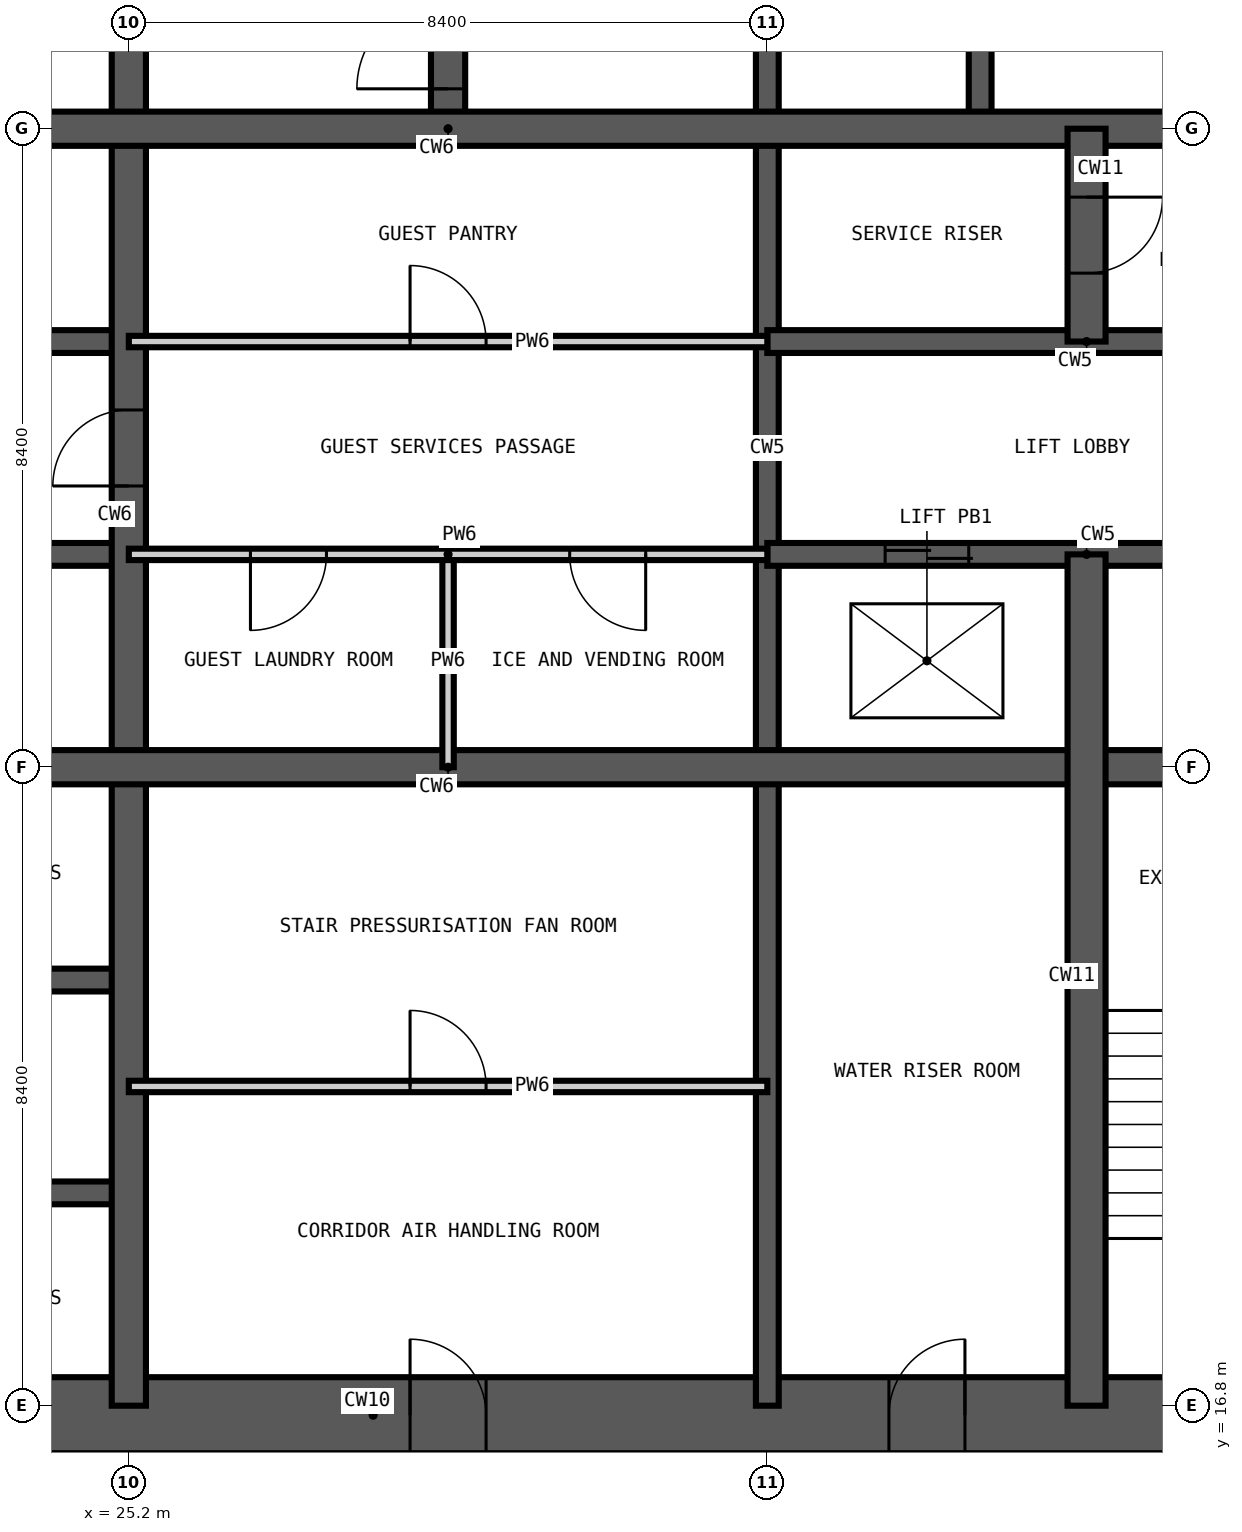
"""IFC4 building model, lengths in metres.
Left out: names, types, materials, properties, quantities, classifications, styles, units other than length and angle.
Written with IfcOpenShell. Run it as: python <this file> out.ifc"""

import sys

from ifc_helpers import new_model, si_unit, direction, frame, frame_2d, origin, place, context, subcontext, project, spatial, rectangle, extrude, element, fill, save


model = new_model("IFC4")
c1 = context("Model", 3, precision=1e-05, world=origin(), true_north=direction((0.0, 1.0)))
c2 = subcontext(c1, "Body", "Model", "MODEL_VIEW")
j1 = project(units=[si_unit("LENGTHUNIT", "METRE"), si_unit("PLANEANGLEUNIT", "RADIAN")], contexts=[c1])
p1 = place(None, origin())
s1 = spatial("IfcSite", under=j1, at=p1, CompositionType="ELEMENT")
p2 = place(p1, origin())
s2 = spatial("IfcBuilding", under=s1, at=p2, CompositionType="ELEMENT")
p3 = place(p2, frame((0.0, 0.0, 118.8)))
s3 = spatial("IfcBuildingStorey", under=s2, at=p3, CompositionType="ELEMENT", Elevation=118.8)
p4 = place(p3, frame((16.175, 16.675, -0.35), z_axis=(0.0, 0.0, 1.0), x_axis=(1.0, 0.0, 0.0)))
e1 = element("IfcWall", 1, at=p4, inside=s3, PredefinedType="SHEAR", context=c2, shape_type="SweptSolid", body=[
    extrude(rectangle(XDim=26.45, YDim=1.0, at=frame_2d((13.225, 0.0))), origin(), (0.0, 0.0, 1.0), 3.6),
])
p5 = place(p4, frame((12.725, 0.0, 0.35)))
e2 = element("IfcOpeningElement", 2, at=p5, cuts=e1, PredefinedType="OPENING", context=c2, shape_type="SweptSolid", body=[
    extrude(rectangle(XDim=1.0, YDim=2.1, at=frame_2d((0.5, 1.05))), frame((0.0, 0.51, 0.0), z_axis=(0.0, -1.0, 0.0), x_axis=(1.0, 0.0, 0.0)), (0.0, 0.0, 1.0), 1.02),
])
p6 = place(p4, frame((19.025, 0.0, 0.35)))
e3 = element("IfcOpeningElement", 3, at=p6, cuts=e1, PredefinedType="OPENING", context=c2, shape_type="SweptSolid", body=[
    extrude(rectangle(XDim=1.0, YDim=2.1, at=frame_2d((0.5, 1.05))), frame((0.0, 0.51, 0.0), z_axis=(0.0, -1.0, 0.0), x_axis=(1.0, 0.0, 0.0)), (0.0, 0.0, 1.0), 1.02),
])
p7 = place(p3, frame((33.6, 16.8, -0.35), z_axis=(0.0, 0.0, 1.0), x_axis=(0.0, 1.0, 0.0)))
e4 = element("IfcWall", 4, at=p7, inside=s3, PredefinedType="SHEAR", context=c2, shape_type="SweptSolid", body=[
    extrude(rectangle(XDim=25.2, YDim=0.3, at=frame_2d((12.6, 0.0))), origin(), (0.0, 0.0, 1.0), 3.6),
])
p8 = place(p7, frame((22.5, 0.0, 0.35)))
e5 = element("IfcOpeningElement", 5, at=p8, cuts=e4, PredefinedType="OPENING", context=c2, shape_type="SweptSolid", body=[
    extrude(rectangle(XDim=1.2, YDim=2.2, at=frame_2d((0.6, 1.1))), frame((0.0, 0.16, 0.0), z_axis=(0.0, -1.0, 0.0), x_axis=(1.0, 0.0, 0.0)), (0.0, 0.0, 1.0), 0.32),
])
p9 = place(p7, frame((18.3, 0.0, 0.35)))
e6 = element("IfcOpeningElement", 6, at=p9, cuts=e4, PredefinedType="OPENING", context=c2, shape_type="SweptSolid", body=[
    extrude(rectangle(XDim=1.2, YDim=2.2, at=frame_2d((0.6, 1.1))), frame((0.0, 0.16, 0.0), z_axis=(0.0, -1.0, 0.0), x_axis=(1.0, 0.0, 0.0)), (0.0, 0.0, 1.0), 0.32),
])
for number, where, z_axis, x_axis in (
    (7, (36.4, 33.6, -0.35), (0.0, 0.0, 1.0), (0.0, 1.0, 0.0)),
    (8, (16.8, 19.6, -0.35), (0.0, 0.0, 1.0), (1.0, 0.0, 0.0)),
    (9, (16.8, 22.4, -0.35), (0.0, 0.0, 1.0), (1.0, 0.0, 0.0)),
):
    element("IfcWall", number, at=place(p3, frame(where, z_axis=z_axis, x_axis=x_axis)), inside=s3, PredefinedType="SHEAR", context=c2, shape_type="SweptSolid", body=[
        extrude(rectangle(XDim=8.4, YDim=0.3, at=frame_2d((4.2, 0.0))), origin(), (0.0, 0.0, 1.0), 3.6),
    ])
p10 = place(p3, frame((16.8, 28.0, -0.35), z_axis=(0.0, 0.0, 1.0), x_axis=(1.0, 0.0, 0.0)))
e10 = element("IfcWall", 10, at=p10, inside=s3, PredefinedType="SHEAR", context=c2, shape_type="SweptSolid", body=[
    extrude(rectangle(XDim=8.4, YDim=0.3, at=frame_2d((4.2, 0.0))), origin(), (0.0, 0.0, 1.0), 3.6),
])
p11 = place(p10, frame((1.55, 0.0, 0.35)))
e11 = element("IfcOpeningElement", 11, at=p11, cuts=e10, PredefinedType="OPENING", context=c2, shape_type="SweptSolid", body=[
    extrude(rectangle(XDim=1.1, YDim=2.2, at=frame_2d((0.55, 1.1))), frame((0.0, 0.16, 0.0), z_axis=(0.0, -1.0, 0.0), x_axis=(1.0, 0.0, 0.0)), (0.0, 0.0, 1.0), 0.32),
])
p12 = place(p10, frame((5.75, 0.0, 0.35)))
e12 = element("IfcOpeningElement", 12, at=p12, cuts=e10, PredefinedType="OPENING", context=c2, shape_type="SweptSolid", body=[
    extrude(rectangle(XDim=1.1, YDim=2.2, at=frame_2d((0.55, 1.1))), frame((0.0, 0.16, 0.0), z_axis=(0.0, -1.0, 0.0), x_axis=(1.0, 0.0, 0.0)), (0.0, 0.0, 1.0), 0.32),
])
p13 = place(p3, frame((33.6, 28.0, -0.35), z_axis=(0.0, 0.0, 1.0), x_axis=(1.0, 0.0, 0.0)))
e13 = element("IfcWall", 13, at=p13, inside=s3, PredefinedType="SHEAR", context=c2, shape_type="SweptSolid", body=[
    extrude(rectangle(XDim=8.4, YDim=0.3, at=frame_2d((4.2, 0.0))), origin(), (0.0, 0.0, 1.0), 3.6),
])
p14 = place(p13, frame((1.55, 0.0, 0.35)))
e14 = element("IfcOpeningElement", 14, at=p14, cuts=e13, PredefinedType="OPENING", context=c2, shape_type="SweptSolid", body=[
    extrude(rectangle(XDim=1.1, YDim=2.2, at=frame_2d((0.55, 1.1))), frame((0.0, 0.16, 0.0), z_axis=(0.0, -1.0, 0.0), x_axis=(1.0, 0.0, 0.0)), (0.0, 0.0, 1.0), 0.32),
])
p15 = place(p13, frame((5.75, 0.0, 0.35)))
e15 = element("IfcOpeningElement", 15, at=p15, cuts=e13, PredefinedType="OPENING", context=c2, shape_type="SweptSolid", body=[
    extrude(rectangle(XDim=1.1, YDim=2.2, at=frame_2d((0.55, 1.1))), frame((0.0, 0.16, 0.0), z_axis=(0.0, -1.0, 0.0), x_axis=(1.0, 0.0, 0.0)), (0.0, 0.0, 1.0), 0.32),
])
p16 = place(p3, frame((16.8, 30.8, -0.35), z_axis=(0.0, 0.0, 1.0), x_axis=(1.0, 0.0, 0.0)))
e16 = element("IfcWall", 16, at=p16, inside=s3, PredefinedType="SHEAR", context=c2, shape_type="SweptSolid", body=[
    extrude(rectangle(XDim=8.4, YDim=0.3, at=frame_2d((4.2, 0.0))), origin(), (0.0, 0.0, 1.0), 3.6),
])
p17 = place(p16, frame((1.55, 0.0, 0.35)))
e17 = element("IfcOpeningElement", 17, at=p17, cuts=e16, PredefinedType="OPENING", context=c2, shape_type="SweptSolid", body=[
    extrude(rectangle(XDim=1.1, YDim=2.2, at=frame_2d((0.55, 1.1))), frame((0.0, 0.16, 0.0), z_axis=(0.0, -1.0, 0.0), x_axis=(1.0, 0.0, 0.0)), (0.0, 0.0, 1.0), 0.32),
])
p18 = place(p16, frame((5.75, 0.0, 0.35)))
e18 = element("IfcOpeningElement", 18, at=p18, cuts=e16, PredefinedType="OPENING", context=c2, shape_type="SweptSolid", body=[
    extrude(rectangle(XDim=1.1, YDim=2.2, at=frame_2d((0.55, 1.1))), frame((0.0, 0.16, 0.0), z_axis=(0.0, -1.0, 0.0), x_axis=(1.0, 0.0, 0.0)), (0.0, 0.0, 1.0), 0.32),
])
p19 = place(p3, frame((33.6, 30.8, -0.35), z_axis=(0.0, 0.0, 1.0), x_axis=(1.0, 0.0, 0.0)))
e19 = element("IfcWall", 19, at=p19, inside=s3, PredefinedType="SHEAR", context=c2, shape_type="SweptSolid", body=[
    extrude(rectangle(XDim=8.4, YDim=0.3, at=frame_2d((4.2, 0.0))), origin(), (0.0, 0.0, 1.0), 3.6),
])
p20 = place(p3, frame((25.2, 16.8, -0.35), z_axis=(0.0, 0.0, 1.0), x_axis=(0.0, 1.0, 0.0)))
e20 = element("IfcWall", 20, at=p20, inside=s3, PredefinedType="SHEAR", context=c2, shape_type="SweptSolid", body=[
    extrude(rectangle(XDim=25.2, YDim=0.45, at=frame_2d((12.6, 0.0))), origin(), (0.0, 0.0, 1.0), 3.6),
])
p21 = place(p20, frame((12.1, 0.0, 0.35)))
e21 = element("IfcOpeningElement", 21, at=p21, cuts=e20, PredefinedType="OPENING", context=c2, shape_type="SweptSolid", body=[
    extrude(rectangle(XDim=1.0, YDim=2.1, at=frame_2d((0.5, 1.05))), frame((0.0, 0.235, 0.0), z_axis=(0.0, -1.0, 0.0), x_axis=(1.0, 0.0, 0.0)), (0.0, 0.0, 1.0), 0.47),
])
p22 = place(p3, frame((29.4, 33.6, -0.35), z_axis=(0.0, 0.0, 1.0), x_axis=(0.0, 1.0, 0.0)))
e22 = element("IfcWall", 22, at=p22, inside=s3, PredefinedType="SHEAR", context=c2, shape_type="SweptSolid", body=[
    extrude(rectangle(XDim=8.4, YDim=0.45, at=frame_2d((4.2, 0.0))), origin(), (0.0, 0.0, 1.0), 3.6),
])
p23 = place(p22, frame((0.525, 0.0, 0.35)))
e23 = element("IfcOpeningElement", 23, at=p23, cuts=e22, PredefinedType="OPENING", context=c2, shape_type="SweptSolid", body=[
    extrude(rectangle(XDim=1.2, YDim=2.2, at=frame_2d((0.6, 1.1))), frame((0.0, 0.235, 0.0), z_axis=(0.0, -1.0, 0.0), x_axis=(1.0, 0.0, 0.0)), (0.0, 0.0, 1.0), 0.47),
])
p24 = place(p3, frame((16.8, 25.2, -0.35), z_axis=(0.0, 0.0, 1.0), x_axis=(1.0, 0.0, 0.0)))
e24 = element("IfcWall", 24, at=p24, inside=s3, PredefinedType="SHEAR", context=c2, shape_type="SweptSolid", body=[
    extrude(rectangle(XDim=25.2, YDim=0.45, at=frame_2d((12.6, 0.0))), origin(), (0.0, 0.0, 1.0), 3.6),
])
p25 = place(p3, frame((16.8, 33.6, -0.35), z_axis=(0.0, 0.0, 1.0), x_axis=(1.0, 0.0, 0.0)))
e25 = element("IfcWall", 25, at=p25, inside=s3, PredefinedType="SHEAR", context=c2, shape_type="SweptSolid", body=[
    extrude(rectangle(XDim=25.2, YDim=0.45, at=frame_2d((12.6, 0.0))), origin(), (0.0, 0.0, 1.0), 3.6),
])
p26 = place(p25, frame((22.6, 0.0, 0.35)))
e26 = element("IfcOpeningElement", 26, at=p26, cuts=e25, PredefinedType="OPENING", context=c2, shape_type="SweptSolid", body=[
    extrude(rectangle(XDim=1.0, YDim=2.1, at=frame_2d((0.5, 1.05))), frame((0.0, 0.235, 0.0), z_axis=(0.0, -1.0, 0.0), x_axis=(1.0, 0.0, 0.0)), (0.0, 0.0, 1.0), 0.47),
])
p27 = place(p3, frame((37.8, 16.8, -0.35), z_axis=(0.0, 0.0, 1.0), x_axis=(0.0, 1.0, 0.0)))
e27 = element("IfcWall", 27, at=p27, inside=s3, PredefinedType="SHEAR", context=c2, shape_type="SweptSolid", body=[
    extrude(rectangle(XDim=11.2, YDim=0.5, at=frame_2d((5.6, 0.0))), origin(), (0.0, 0.0, 1.0), 3.6),
])
p28 = place(p3, frame((37.8, 30.8, -0.35), z_axis=(0.0, 0.0, 1.0), x_axis=(0.0, 1.0, 0.0)))
e28 = element("IfcWall", 28, at=p28, inside=s3, PredefinedType="SHEAR", context=c2, shape_type="SweptSolid", body=[
    extrude(rectangle(XDim=2.8, YDim=0.5, at=frame_2d((1.4, 0.0))), origin(), (0.0, 0.0, 1.0), 3.6),
])
p29 = place(p28, frame((0.9, 0.0, 0.35)))
e29 = element("IfcOpeningElement", 29, at=p29, cuts=e28, PredefinedType="OPENING", context=c2, shape_type="SweptSolid", body=[
    extrude(rectangle(XDim=1.0, YDim=2.1, at=frame_2d((0.5, 1.05))), frame((0.0, 0.26, 0.0), z_axis=(0.0, -1.0, 0.0), x_axis=(1.0, 0.0, 0.0)), (0.0, 0.0, 1.0), 0.52),
])
p30 = place(p3, frame((29.4, 25.2, 0.0), z_axis=(0.0, 0.0, 1.0), x_axis=(0.0, 1.0, 0.0)))
e30 = element("IfcWall", 30, at=p30, inside=s3, PredefinedType="PARTITIONING", context=c2, shape_type="SweptSolid", body=[
    extrude(rectangle(XDim=2.8, YDim=0.15, at=frame_2d((1.4, 0.0))), origin(), (0.0, 0.0, 1.0), 3.25),
])
p31 = place(p3, frame((25.2, 21.0, 0.0), z_axis=(0.0, 0.0, 1.0), x_axis=(1.0, 0.0, 0.0)))
e31 = element("IfcWall", 31, at=p31, inside=s3, PredefinedType="PARTITIONING", context=c2, shape_type="SweptSolid", body=[
    extrude(rectangle(XDim=8.4, YDim=0.15, at=frame_2d((4.2, 0.0))), origin(), (0.0, 0.0, 1.0), 3.25),
])
p32 = place(p31, frame((3.7, 0.0, 0.0)))
e32 = element("IfcOpeningElement", 32, at=p32, cuts=e31, PredefinedType="OPENING", context=c2, shape_type="SweptSolid", body=[
    extrude(rectangle(XDim=1.0, YDim=2.1, at=frame_2d((0.5, 1.05))), frame((0.0, 0.085, 0.0), z_axis=(0.0, -1.0, 0.0), x_axis=(1.0, 0.0, 0.0)), (0.0, 0.0, 1.0), 0.17),
])
p33 = place(p3, frame((25.2, 28.0, 0.0), z_axis=(0.0, 0.0, 1.0), x_axis=(1.0, 0.0, 0.0)))
e33 = element("IfcWall", 33, at=p33, inside=s3, PredefinedType="PARTITIONING", context=c2, shape_type="SweptSolid", body=[
    extrude(rectangle(XDim=8.4, YDim=0.15, at=frame_2d((4.2, 0.0))), origin(), (0.0, 0.0, 1.0), 3.25),
])
p34 = place(p33, frame((1.6, 0.0, 0.0)))
e34 = element("IfcOpeningElement", 34, at=p34, cuts=e33, PredefinedType="OPENING", context=c2, shape_type="SweptSolid", body=[
    extrude(rectangle(XDim=1.0, YDim=2.1, at=frame_2d((0.5, 1.05))), frame((0.0, 0.085, 0.0), z_axis=(0.0, -1.0, 0.0), x_axis=(1.0, 0.0, 0.0)), (0.0, 0.0, 1.0), 0.17),
])
p35 = place(p33, frame((5.8, 0.0, 0.0)))
e35 = element("IfcOpeningElement", 35, at=p35, cuts=e33, PredefinedType="OPENING", context=c2, shape_type="SweptSolid", body=[
    extrude(rectangle(XDim=1.0, YDim=2.1, at=frame_2d((0.5, 1.05))), frame((0.0, 0.085, 0.0), z_axis=(0.0, -1.0, 0.0), x_axis=(1.0, 0.0, 0.0)), (0.0, 0.0, 1.0), 0.17),
])
p36 = place(p3, frame((25.2, 30.8, 0.0), z_axis=(0.0, 0.0, 1.0), x_axis=(1.0, 0.0, 0.0)))
e36 = element("IfcWall", 36, at=p36, inside=s3, PredefinedType="PARTITIONING", context=c2, shape_type="SweptSolid", body=[
    extrude(rectangle(XDim=8.4, YDim=0.15, at=frame_2d((4.2, 0.0))), origin(), (0.0, 0.0, 1.0), 3.25),
])
p37 = place(p36, frame((3.7, 0.0, 0.0)))
e37 = element("IfcOpeningElement", 37, at=p37, cuts=e36, PredefinedType="OPENING", context=c2, shape_type="SweptSolid", body=[
    extrude(rectangle(XDim=1.0, YDim=2.1, at=frame_2d((0.5, 1.05))), frame((0.0, 0.085, 0.0), z_axis=(0.0, -1.0, 0.0), x_axis=(1.0, 0.0, 0.0)), (0.0, 0.0, 1.0), 0.17),
])
p38 = place(p23, origin())
e38 = element("IfcDoor", 38, at=p38, inside=s3, OperationType="SINGLE_SWING_LEFT", PredefinedType="DOOR", context=c2, shape_type="SweptSolid", body=[
    extrude(rectangle(XDim=1.2, YDim=2.2, at=frame_2d((0.6, 1.1))), frame((0.0, 0.025, 0.0), z_axis=(0.0, -1.0, 0.0), x_axis=(1.0, 0.0, 0.0)), (0.0, 0.0, 1.0), 0.05),
])
fill(e23, e38)
p39 = place(p14, origin())
e39 = element("IfcDoor", 39, at=p39, inside=s3, OperationType="DOUBLE_DOOR_SLIDING", PredefinedType="DOOR", context=c2, shape_type="SweptSolid", body=[
    extrude(rectangle(XDim=1.1, YDim=2.2, at=frame_2d((0.55, 1.1))), frame((0.0, 0.025, 0.0), z_axis=(0.0, -1.0, 0.0), x_axis=(1.0, 0.0, 0.0)), (0.0, 0.0, 1.0), 0.05),
])
fill(e14, e39)
p40 = place(p21, origin())
e40 = element("IfcDoor", 40, at=p40, inside=s3, OperationType="SINGLE_SWING_LEFT", PredefinedType="DOOR", context=c2, shape_type="SweptSolid", body=[
    extrude(rectangle(XDim=1.0, YDim=2.1, at=frame_2d((0.5, 1.05))), frame((0.0, 0.025, 0.0), z_axis=(0.0, -1.0, 0.0), x_axis=(1.0, 0.0, 0.0)), (0.0, 0.0, 1.0), 0.05),
])
fill(e21, e40)
p41 = place(p34, frame((1.0, 0.0, 0.0), z_axis=(0.0, 0.0, 1.0), x_axis=(-1.0, 0.0, 0.0)))
e41 = element("IfcDoor", 41, at=p41, inside=s3, OperationType="SINGLE_SWING_RIGHT", PredefinedType="DOOR", context=c2, shape_type="SweptSolid", body=[
    extrude(rectangle(XDim=1.0, YDim=2.1, at=frame_2d((0.5, 1.05))), frame((0.0, 0.025, 0.0), z_axis=(0.0, -1.0, 0.0), x_axis=(1.0, 0.0, 0.0)), (0.0, 0.0, 1.0), 0.05),
])
fill(e34, e41)
p42 = place(p35, frame((1.0, 0.0, 0.0), z_axis=(0.0, 0.0, 1.0), x_axis=(-1.0, 0.0, 0.0)))
e42 = element("IfcDoor", 42, at=p42, inside=s3, OperationType="SINGLE_SWING_LEFT", PredefinedType="DOOR", context=c2, shape_type="SweptSolid", body=[
    extrude(rectangle(XDim=1.0, YDim=2.1, at=frame_2d((0.5, 1.05))), frame((0.0, 0.025, 0.0), z_axis=(0.0, -1.0, 0.0), x_axis=(1.0, 0.0, 0.0)), (0.0, 0.0, 1.0), 0.05),
])
fill(e35, e42)
p43 = place(p37, origin())
e43 = element("IfcDoor", 43, at=p43, inside=s3, OperationType="SINGLE_SWING_LEFT", PredefinedType="DOOR", context=c2, shape_type="SweptSolid", body=[
    extrude(rectangle(XDim=1.0, YDim=2.1, at=frame_2d((0.5, 1.05))), frame((0.0, 0.025, 0.0), z_axis=(0.0, -1.0, 0.0), x_axis=(1.0, 0.0, 0.0)), (0.0, 0.0, 1.0), 0.05),
])
fill(e37, e43)
p44 = place(p29, frame((1.0, 0.0, 0.0), z_axis=(0.0, 0.0, 1.0), x_axis=(-1.0, 0.0, 0.0)))
e44 = element("IfcDoor", 44, at=p44, inside=s3, OperationType="SINGLE_SWING_LEFT", PredefinedType="DOOR", context=c2, shape_type="SweptSolid", body=[
    extrude(rectangle(XDim=1.0, YDim=2.1, at=frame_2d((0.5, 1.05))), frame((0.0, 0.025, 0.0), z_axis=(0.0, -1.0, 0.0), x_axis=(1.0, 0.0, 0.0)), (0.0, 0.0, 1.0), 0.05),
])
fill(e29, e44)
p45 = place(p5, origin())
e45 = element("IfcDoor", 45, at=p45, inside=s3, OperationType="SINGLE_SWING_LEFT", PredefinedType="DOOR", context=c2, shape_type="SweptSolid", body=[
    extrude(rectangle(XDim=1.0, YDim=2.1, at=frame_2d((0.5, 1.05))), frame((0.0, 0.025, 0.0), z_axis=(0.0, -1.0, 0.0), x_axis=(1.0, 0.0, 0.0)), (0.0, 0.0, 1.0), 0.05),
])
fill(e2, e45)
p46 = place(p32, origin())
e46 = element("IfcDoor", 46, at=p46, inside=s3, OperationType="SINGLE_SWING_LEFT", PredefinedType="DOOR", context=c2, shape_type="SweptSolid", body=[
    extrude(rectangle(XDim=1.0, YDim=2.1, at=frame_2d((0.5, 1.05))), frame((0.0, 0.025, 0.0), z_axis=(0.0, -1.0, 0.0), x_axis=(1.0, 0.0, 0.0)), (0.0, 0.0, 1.0), 0.05),
])
fill(e32, e46)
p47 = place(p6, origin())
e47 = element("IfcDoor", 47, at=p47, inside=s3, OperationType="SINGLE_SWING_RIGHT", PredefinedType="DOOR", context=c2, shape_type="SweptSolid", body=[
    extrude(rectangle(XDim=1.0, YDim=2.1, at=frame_2d((0.5, 1.05))), frame((0.0, 0.025, 0.0), z_axis=(0.0, -1.0, 0.0), x_axis=(1.0, 0.0, 0.0)), (0.0, 0.0, 1.0), 0.05),
])
fill(e3, e47)
save(model, sys.argv[1])
